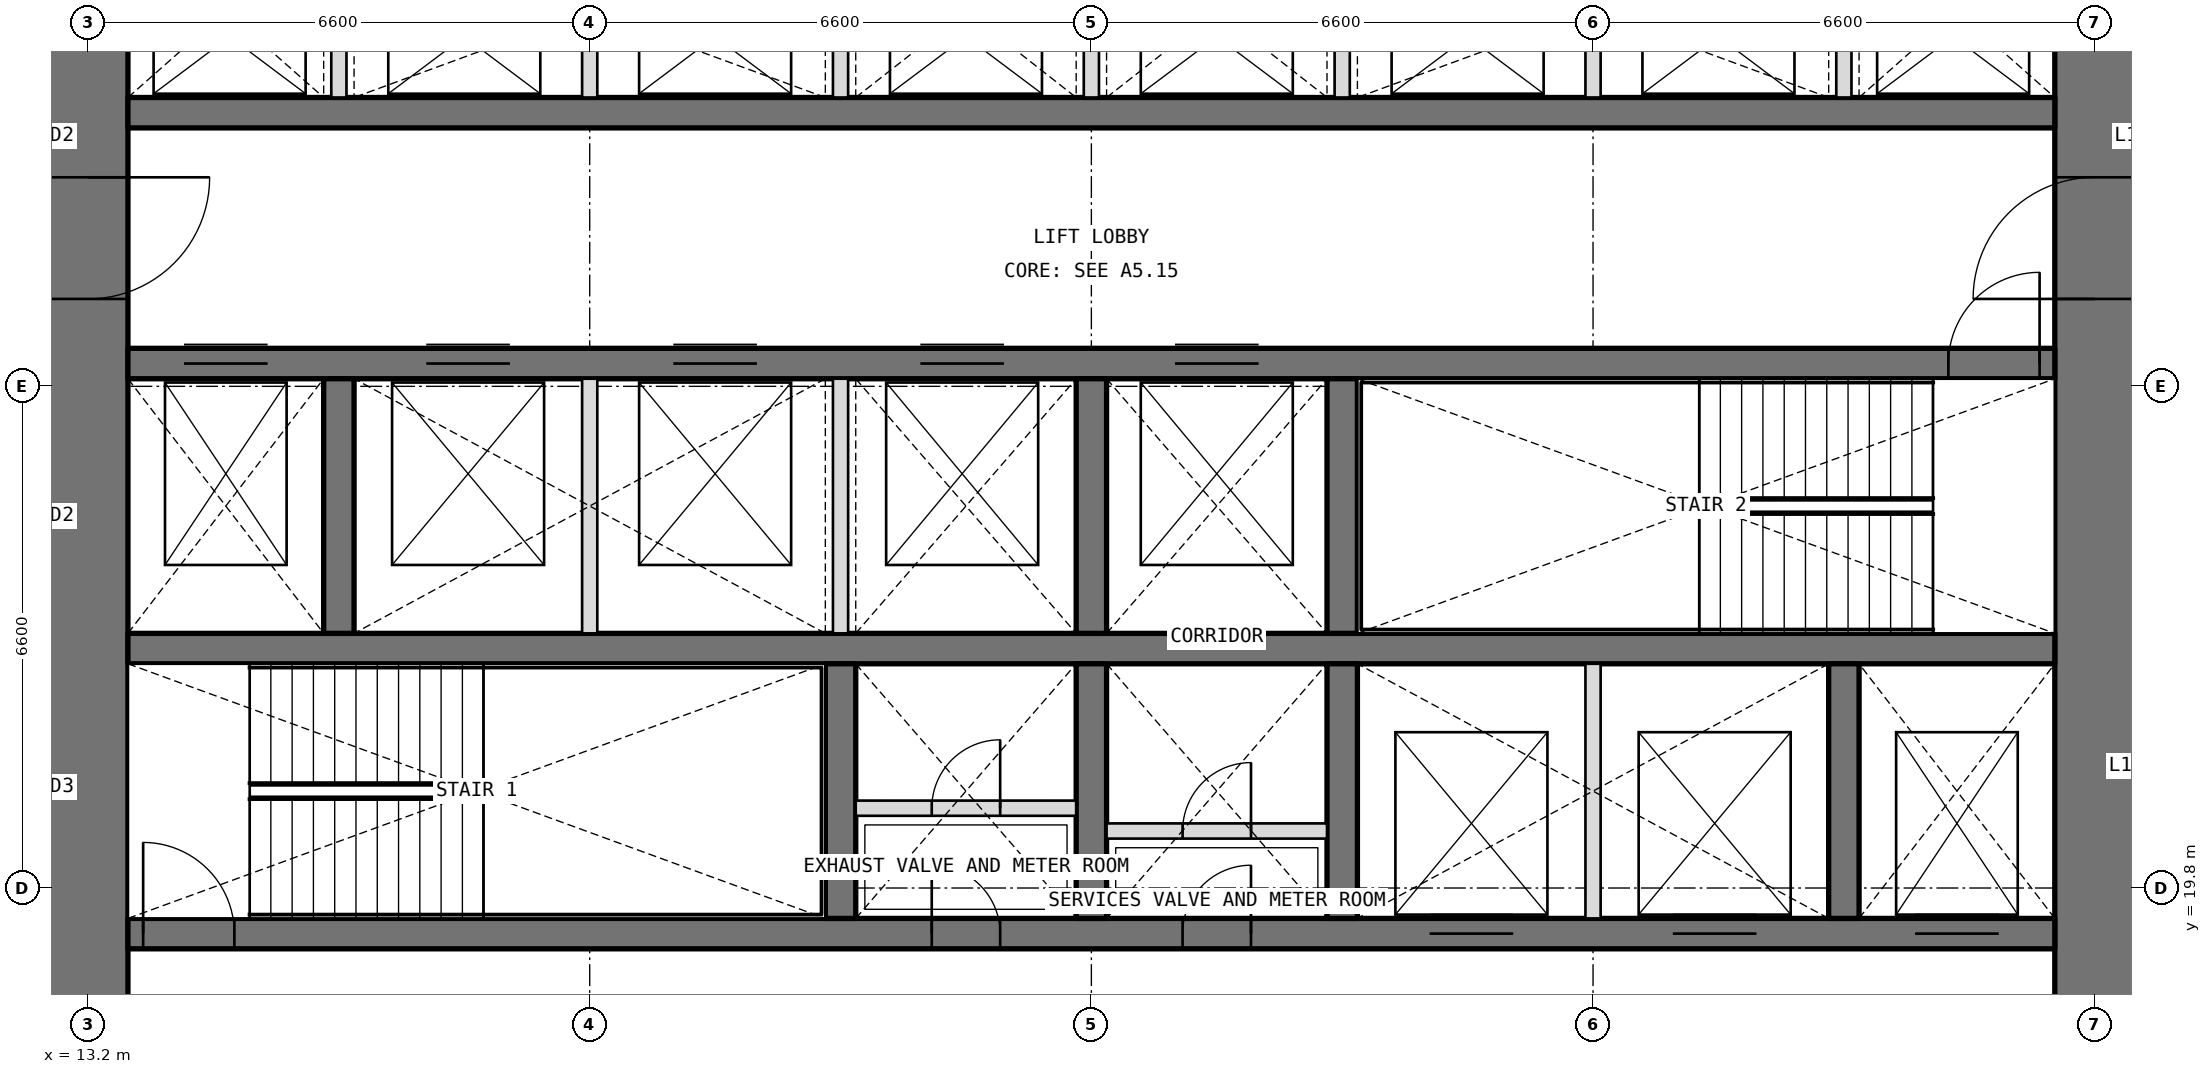
"""IFC4 building model, lengths in metres.
Left out: names, types, materials, properties, quantities, classifications, styles, units other than length and angle.
Written with IfcOpenShell. Run it as: python <this file> out.ifc"""

import sys

from ifc_helpers import new_model, si_unit, direction, frame, frame_2d, origin, place, context, subcontext, project, spatial, rectangle, extrude, element, fill, save


model = new_model("IFC4")
c1 = context("Model", 3, precision=1e-05, world=origin(), true_north=direction((0.0, 1.0)))
c2 = subcontext(c1, "Body", "Model", "MODEL_VIEW")
j1 = project(units=[si_unit("LENGTHUNIT", "METRE"), si_unit("PLANEANGLEUNIT", "RADIAN")], contexts=[c1])
p1 = place(None, origin())
s1 = spatial("IfcSite", under=j1, at=p1, CompositionType="ELEMENT")
p2 = place(p1, origin())
s2 = spatial("IfcBuilding", under=s1, at=p2, CompositionType="ELEMENT")
p3 = place(p2, frame((0.0, 0.0, 59.1)))
s3 = spatial("IfcBuildingStorey", under=s2, at=p3, CompositionType="ELEMENT", Elevation=59.1)
p4 = place(p3, frame((39.6, 13.725, 0.0), z_axis=(0.0, 0.0, 1.0), x_axis=(0.0, 1.0, 0.0)))
e1 = element("IfcWall", 1, at=p4, inside=s3, PredefinedType="SHEAR", context=c2, shape_type="SweptSolid", body=[
    extrude(rectangle(XDim=18.75, YDim=1.05, at=frame_2d((9.375, 0.0))), origin(), (0.0, 0.0, 1.0), 4.2),
])
p5 = place(p4, frame((3.025, 0.0, 0.0)))
e2 = element("IfcOpeningElement", 2, at=p5, cuts=e1, PredefinedType="OPENING", context=c2, shape_type="SweptSolid", body=[
    extrude(rectangle(XDim=1.6, YDim=2.1, at=frame_2d((0.8, 1.05))), frame((0.0, 0.535, 0.0), z_axis=(0.0, -1.0, 0.0), x_axis=(1.0, 0.0, 0.0)), (0.0, 0.0, 1.0), 1.07),
])
p6 = place(p4, frame((13.825, 0.0, 0.0)))
e3 = element("IfcOpeningElement", 3, at=p6, cuts=e1, PredefinedType="OPENING", context=c2, shape_type="SweptSolid", body=[
    extrude(rectangle(XDim=1.6, YDim=2.1, at=frame_2d((0.8, 1.05))), frame((0.0, 0.535, 0.0), z_axis=(0.0, -1.0, 0.0), x_axis=(1.0, 0.0, 0.0)), (0.0, 0.0, 1.0), 1.07),
])
p7 = place(p3, frame((13.2, 32.475, 0.0), z_axis=(0.0, 0.0, 1.0), x_axis=(0.0, -1.0, 0.0)))
e4 = element("IfcWall", 4, at=p7, inside=s3, PredefinedType="SHEAR", context=c2, shape_type="SweptSolid", body=[
    extrude(rectangle(XDim=18.75, YDim=1.05, at=frame_2d((9.375, 0.0))), origin(), (0.0, 0.0, 1.0), 4.2),
])
p8 = place(p7, frame((14.125, 0.0, 0.0)))
e5 = element("IfcOpeningElement", 5, at=p8, cuts=e4, PredefinedType="OPENING", context=c2, shape_type="SweptSolid", body=[
    extrude(rectangle(XDim=1.6, YDim=2.1, at=frame_2d((0.8, 1.05))), frame((0.0, 0.535, 0.0), z_axis=(0.0, -1.0, 0.0), x_axis=(1.0, 0.0, 0.0)), (0.0, 0.0, 1.0), 1.07),
])
p9 = place(p7, frame((3.325, 0.0, 0.0)))
e6 = element("IfcOpeningElement", 6, at=p9, cuts=e4, PredefinedType="OPENING", context=c2, shape_type="SweptSolid", body=[
    extrude(rectangle(XDim=1.6, YDim=2.1, at=frame_2d((0.8, 1.05))), frame((0.0, 0.535, 0.0), z_axis=(0.0, -1.0, 0.0), x_axis=(1.0, 0.0, 0.0)), (0.0, 0.0, 1.0), 1.07),
])
p10 = place(p3, frame((13.725, 19.2, 0.0), z_axis=(0.0, 0.0, 1.0), x_axis=(1.0, 0.0, 0.0)))
e7 = element("IfcWall", 7, at=p10, inside=s3, PredefinedType="SHEAR", context=c2, shape_type="SweptSolid", body=[
    extrude(rectangle(XDim=25.35, YDim=0.4, at=frame_2d((12.675, 0.0))), origin(), (0.0, 0.0, 1.0), 4.2),
])
p11 = place(p10, frame((10.575, 0.0, 0.0)))
e8 = element("IfcOpeningElement", 8, at=p11, cuts=e7, PredefinedType="OPENING", context=c2, shape_type="SweptSolid", body=[
    extrude(rectangle(XDim=0.9, YDim=2.1, at=frame_2d((0.45, 1.05))), frame((0.0, 0.21, 0.0), z_axis=(0.0, -1.0, 0.0), x_axis=(1.0, 0.0, 0.0)), (0.0, 0.0, 1.0), 0.42),
])
p12 = place(p10, frame((13.875, 0.0, 0.0)))
e9 = element("IfcOpeningElement", 9, at=p12, cuts=e7, PredefinedType="OPENING", context=c2, shape_type="SweptSolid", body=[
    extrude(rectangle(XDim=0.9, YDim=2.1, at=frame_2d((0.45, 1.05))), frame((0.0, 0.21, 0.0), z_axis=(0.0, -1.0, 0.0), x_axis=(1.0, 0.0, 0.0)), (0.0, 0.0, 1.0), 0.42),
])
p13 = place(p10, frame((0.2, 0.0, 0.0)))
e10 = element("IfcOpeningElement", 10, at=p13, cuts=e7, PredefinedType="OPENING", context=c2, shape_type="SweptSolid", body=[
    extrude(rectangle(XDim=1.2, YDim=2.1, at=frame_2d((0.6, 1.05))), frame((0.0, 0.21, 0.0), z_axis=(0.0, -1.0, 0.0), x_axis=(1.0, 0.0, 0.0)), (0.0, 0.0, 1.0), 0.42),
])
p14 = place(p10, frame((23.512, 0.0, 0.0)))
e11 = element("IfcOpeningElement", 11, at=p14, cuts=e7, PredefinedType="OPENING", context=c2, shape_type="SweptSolid", body=[
    extrude(rectangle(XDim=1.1, YDim=2.1, at=frame_2d((0.55, 1.05))), frame((0.0, 0.21, 0.0), z_axis=(0.0, -1.0, 0.0), x_axis=(1.0, 0.0, 0.0)), (0.0, 0.0, 1.0), 0.42),
])
p15 = place(p10, frame((17.125, 0.0, 0.0)))
e12 = element("IfcOpeningElement", 12, at=p15, cuts=e7, PredefinedType="OPENING", context=c2, shape_type="SweptSolid", body=[
    extrude(rectangle(XDim=1.1, YDim=2.1, at=frame_2d((0.55, 1.05))), frame((0.0, 0.21, 0.0), z_axis=(0.0, -1.0, 0.0), x_axis=(1.0, 0.0, 0.0)), (0.0, 0.0, 1.0), 0.42),
])
p16 = place(p10, frame((20.325, 0.0, 0.0)))
e13 = element("IfcOpeningElement", 13, at=p16, cuts=e7, PredefinedType="OPENING", context=c2, shape_type="SweptSolid", body=[
    extrude(rectangle(XDim=1.1, YDim=2.1, at=frame_2d((0.55, 1.05))), frame((0.0, 0.21, 0.0), z_axis=(0.0, -1.0, 0.0), x_axis=(1.0, 0.0, 0.0)), (0.0, 0.0, 1.0), 0.42),
])
p17 = place(p3, frame((13.725, 22.95, 0.0), z_axis=(0.0, 0.0, 1.0), x_axis=(1.0, 0.0, 0.0)))
e14 = element("IfcWall", 14, at=p17, inside=s3, PredefinedType="SHEAR", context=c2, shape_type="SweptSolid", body=[
    extrude(rectangle(XDim=25.35, YDim=0.4, at=frame_2d((12.675, 0.0))), origin(), (0.0, 0.0, 1.0), 4.2),
])
p18 = place(p3, frame((13.725, 26.7, 0.0), z_axis=(0.0, 0.0, 1.0), x_axis=(1.0, 0.0, 0.0)))
e15 = element("IfcWall", 15, at=p18, inside=s3, PredefinedType="SHEAR", context=c2, shape_type="SweptSolid", body=[
    extrude(rectangle(XDim=25.35, YDim=0.4, at=frame_2d((12.675, 0.0))), origin(), (0.0, 0.0, 1.0), 4.2),
])
p19 = place(p18, frame((23.95, 0.0, 0.0)))
e16 = element("IfcOpeningElement", 16, at=p19, cuts=e15, PredefinedType="OPENING", context=c2, shape_type="SweptSolid", body=[
    extrude(rectangle(XDim=1.2, YDim=2.1, at=frame_2d((0.6, 1.05))), frame((0.0, 0.21, 0.0), z_axis=(0.0, -1.0, 0.0), x_axis=(1.0, 0.0, 0.0)), (0.0, 0.0, 1.0), 0.42),
])
p20 = place(p18, frame((0.738, 0.0, 0.0)))
e17 = element("IfcOpeningElement", 17, at=p20, cuts=e15, PredefinedType="OPENING", context=c2, shape_type="SweptSolid", body=[
    extrude(rectangle(XDim=1.1, YDim=2.1, at=frame_2d((0.55, 1.05))), frame((0.0, 0.21, 0.0), z_axis=(0.0, -1.0, 0.0), x_axis=(1.0, 0.0, 0.0)), (0.0, 0.0, 1.0), 0.42),
])
p21 = place(p18, frame((3.925, 0.0, 0.0)))
e18 = element("IfcOpeningElement", 18, at=p21, cuts=e15, PredefinedType="OPENING", context=c2, shape_type="SweptSolid", body=[
    extrude(rectangle(XDim=1.1, YDim=2.1, at=frame_2d((0.55, 1.05))), frame((0.0, 0.21, 0.0), z_axis=(0.0, -1.0, 0.0), x_axis=(1.0, 0.0, 0.0)), (0.0, 0.0, 1.0), 0.42),
])
p22 = place(p18, frame((7.175, 0.0, 0.0)))
e19 = element("IfcOpeningElement", 19, at=p22, cuts=e15, PredefinedType="OPENING", context=c2, shape_type="SweptSolid", body=[
    extrude(rectangle(XDim=1.1, YDim=2.1, at=frame_2d((0.55, 1.05))), frame((0.0, 0.21, 0.0), z_axis=(0.0, -1.0, 0.0), x_axis=(1.0, 0.0, 0.0)), (0.0, 0.0, 1.0), 0.42),
])
p23 = place(p18, frame((10.425, 0.0, 0.0)))
e20 = element("IfcOpeningElement", 20, at=p23, cuts=e15, PredefinedType="OPENING", context=c2, shape_type="SweptSolid", body=[
    extrude(rectangle(XDim=1.1, YDim=2.1, at=frame_2d((0.55, 1.05))), frame((0.0, 0.21, 0.0), z_axis=(0.0, -1.0, 0.0), x_axis=(1.0, 0.0, 0.0)), (0.0, 0.0, 1.0), 0.42),
])
p24 = place(p18, frame((13.775, 0.0, 0.0)))
e21 = element("IfcOpeningElement", 21, at=p24, cuts=e15, PredefinedType="OPENING", context=c2, shape_type="SweptSolid", body=[
    extrude(rectangle(XDim=1.1, YDim=2.1, at=frame_2d((0.55, 1.05))), frame((0.0, 0.21, 0.0), z_axis=(0.0, -1.0, 0.0), x_axis=(1.0, 0.0, 0.0)), (0.0, 0.0, 1.0), 0.42),
])
p25 = place(p3, frame((13.725, 30.0, 0.0), z_axis=(0.0, 0.0, 1.0), x_axis=(1.0, 0.0, 0.0)))
e22 = element("IfcWall", 22, at=p25, inside=s3, PredefinedType="SHEAR", context=c2, shape_type="SweptSolid", body=[
    extrude(rectangle(XDim=25.35, YDim=0.4, at=frame_2d((12.675, 0.0))), origin(), (0.0, 0.0, 1.0), 4.2),
])
for number, where, z_axis, x_axis in (
    (23, (23.1, 19.4, 0.0), (0.0, 0.0, 1.0), (0.0, 1.0, 0.0)),
    (24, (26.4, 19.4, 0.0), (0.0, 0.0, 1.0), (0.0, 1.0, 0.0)),
    (25, (29.7, 19.4, 0.0), (0.0, 0.0, 1.0), (0.0, 1.0, 0.0)),
    (26, (36.3, 19.4, 0.0), (0.0, 0.0, 1.0), (0.0, 1.0, 0.0)),
    (27, (16.5, 23.15, 0.0), (0.0, 0.0, 1.0), (0.0, 1.0, 0.0)),
    (28, (26.4, 23.15, 0.0), (0.0, 0.0, 1.0), (0.0, 1.0, 0.0)),
    (29, (29.7, 23.15, 0.0), (0.0, 0.0, 1.0), (0.0, 1.0, 0.0)),
):
    element("IfcWall", number, at=place(p3, frame(where, z_axis=z_axis, x_axis=x_axis)), inside=s3, PredefinedType="SHEAR", context=c2, shape_type="SweptSolid", body=[
        extrude(rectangle(XDim=3.35, YDim=0.4, at=frame_2d((1.675, 0.0))), origin(), (0.0, 0.0, 1.0), 4.2),
    ])
for number, where, z_axis, x_axis in (
    (30, (16.5, 30.2, 0.0), (0.0, 0.0, 1.0), (0.0, 1.0, 0.0)),
    (31, (19.8, 30.2, 0.0), (0.0, 0.0, 1.0), (0.0, 1.0, 0.0)),
    (32, (23.1, 30.2, 0.0), (0.0, 0.0, 1.0), (0.0, 1.0, 0.0)),
    (33, (26.4, 30.2, 0.0), (0.0, 0.0, 1.0), (0.0, 1.0, 0.0)),
    (34, (29.7, 30.2, 0.0), (0.0, 0.0, 1.0), (0.0, 1.0, 0.0)),
    (35, (33.0, 30.2, 0.0), (0.0, 0.0, 1.0), (0.0, 1.0, 0.0)),
    (36, (36.3, 30.2, 0.0), (0.0, 0.0, 1.0), (0.0, 1.0, 0.0)),
):
    element("IfcWall", number, at=place(p3, frame(where, z_axis=z_axis, x_axis=x_axis)), inside=s3, PredefinedType="PARTITIONING", context=c2, shape_type="SweptSolid", body=[
        extrude(rectangle(XDim=2.275, YDim=0.2, at=frame_2d((1.138, 0.0))), origin(), (0.0, 0.0, 1.0), 4.2),
    ])
for number, where, z_axis, x_axis in (
    (37, (33.0, 19.4, 0.0), (0.0, 0.0, 1.0), (0.0, 1.0, 0.0)),
    (38, (19.8, 23.15, 0.0), (0.0, 0.0, 1.0), (0.0, 1.0, 0.0)),
    (39, (23.1, 23.15, 0.0), (0.0, 0.0, 1.0), (0.0, 1.0, 0.0)),
):
    element("IfcWall", number, at=place(p3, frame(where, z_axis=z_axis, x_axis=x_axis)), inside=s3, PredefinedType="PARTITIONING", context=c2, shape_type="SweptSolid", body=[
        extrude(rectangle(XDim=3.35, YDim=0.2, at=frame_2d((1.675, 0.0))), origin(), (0.0, 0.0, 1.0), 4.2),
    ])
p26 = place(p3, frame((23.3, 20.85, 0.0), z_axis=(0.0, 0.0, 1.0), x_axis=(1.0, 0.0, 0.0)))
e40 = element("IfcWall", 40, at=p26, inside=s3, PredefinedType="PARTITIONING", context=c2, shape_type="SweptSolid", body=[
    extrude(rectangle(XDim=2.9, YDim=0.2, at=frame_2d((1.45, 0.0))), origin(), (0.0, 0.0, 1.0), 3.9),
])
p27 = place(p26, frame((1.0, 0.0, 0.0)))
e41 = element("IfcOpeningElement", 41, at=p27, cuts=e40, PredefinedType="OPENING", context=c2, shape_type="SweptSolid", body=[
    extrude(rectangle(XDim=0.9, YDim=2.1, at=frame_2d((0.45, 1.05))), frame((0.0, 0.11, 0.0), z_axis=(0.0, -1.0, 0.0), x_axis=(1.0, 0.0, 0.0)), (0.0, 0.0, 1.0), 0.22),
])
p28 = place(p3, frame((26.6, 20.55, 0.0), z_axis=(0.0, 0.0, 1.0), x_axis=(1.0, 0.0, 0.0)))
e42 = element("IfcWall", 42, at=p28, inside=s3, PredefinedType="PARTITIONING", context=c2, shape_type="SweptSolid", body=[
    extrude(rectangle(XDim=2.9, YDim=0.2, at=frame_2d((1.45, 0.0))), origin(), (0.0, 0.0, 1.0), 3.9),
])
p29 = place(p28, frame((1.0, 0.0, 0.0)))
e43 = element("IfcOpeningElement", 43, at=p29, cuts=e42, PredefinedType="OPENING", context=c2, shape_type="SweptSolid", body=[
    extrude(rectangle(XDim=0.9, YDim=2.1, at=frame_2d((0.45, 1.05))), frame((0.0, 0.11, 0.0), z_axis=(0.0, -1.0, 0.0), x_axis=(1.0, 0.0, 0.0)), (0.0, 0.0, 1.0), 0.22),
])
p30 = place(p11, origin())
e44 = element("IfcDoor", 44, at=p30, inside=s3, OperationType="SINGLE_SWING_LEFT", PredefinedType="DOOR", context=c2, shape_type="SweptSolid", body=[
    extrude(rectangle(XDim=0.9, YDim=2.1, at=frame_2d((0.45, 1.05))), frame((0.0, 0.025, 0.0), z_axis=(0.0, -1.0, 0.0), x_axis=(1.0, 0.0, 0.0)), (0.0, 0.0, 1.0), 0.05),
])
fill(e8, e44)
p31 = place(p27, origin())
e45 = element("IfcDoor", 45, at=p31, inside=s3, OperationType="SINGLE_SWING_RIGHT", PredefinedType="DOOR", context=c2, shape_type="SweptSolid", body=[
    extrude(rectangle(XDim=0.9, YDim=2.1, at=frame_2d((0.45, 1.05))), frame((0.0, 0.025, 0.0), z_axis=(0.0, -1.0, 0.0), x_axis=(1.0, 0.0, 0.0)), (0.0, 0.0, 1.0), 0.05),
])
fill(e41, e45)
p32 = place(p12, origin())
e46 = element("IfcDoor", 46, at=p32, inside=s3, OperationType="SINGLE_SWING_RIGHT", PredefinedType="DOOR", context=c2, shape_type="SweptSolid", body=[
    extrude(rectangle(XDim=0.9, YDim=2.1, at=frame_2d((0.45, 1.05))), frame((0.0, 0.025, 0.0), z_axis=(0.0, -1.0, 0.0), x_axis=(1.0, 0.0, 0.0)), (0.0, 0.0, 1.0), 0.05),
])
fill(e9, e46)
p33 = place(p29, origin())
e47 = element("IfcDoor", 47, at=p33, inside=s3, OperationType="SINGLE_SWING_RIGHT", PredefinedType="DOOR", context=c2, shape_type="SweptSolid", body=[
    extrude(rectangle(XDim=0.9, YDim=2.1, at=frame_2d((0.45, 1.05))), frame((0.0, 0.025, 0.0), z_axis=(0.0, -1.0, 0.0), x_axis=(1.0, 0.0, 0.0)), (0.0, 0.0, 1.0), 0.05),
])
fill(e43, e47)
p34 = place(p13, origin())
e48 = element("IfcDoor", 48, at=p34, inside=s3, OperationType="SINGLE_SWING_LEFT", PredefinedType="DOOR", context=c2, shape_type="SweptSolid", body=[
    extrude(rectangle(XDim=1.2, YDim=2.1, at=frame_2d((0.6, 1.05))), frame((0.0, 0.025, 0.0), z_axis=(0.0, -1.0, 0.0), x_axis=(1.0, 0.0, 0.0)), (0.0, 0.0, 1.0), 0.05),
])
fill(e10, e48)
p35 = place(p19, origin())
e49 = element("IfcDoor", 49, at=p35, inside=s3, OperationType="SINGLE_SWING_RIGHT", PredefinedType="DOOR", context=c2, shape_type="SweptSolid", body=[
    extrude(rectangle(XDim=1.2, YDim=2.1, at=frame_2d((0.6, 1.05))), frame((0.0, 0.025, 0.0), z_axis=(0.0, -1.0, 0.0), x_axis=(1.0, 0.0, 0.0)), (0.0, 0.0, 1.0), 0.05),
])
fill(e16, e49)
p36 = place(p9, origin())
e50 = element("IfcDoor", 50, at=p36, inside=s3, OperationType="DOUBLE_DOOR_DOUBLE_SWING", PredefinedType="DOOR", context=c2, shape_type="SweptSolid", body=[
    extrude(rectangle(XDim=1.6, YDim=2.1, at=frame_2d((0.8, 1.05))), frame((0.0, 0.025, 0.0), z_axis=(0.0, -1.0, 0.0), x_axis=(1.0, 0.0, 0.0)), (0.0, 0.0, 1.0), 0.05),
])
fill(e6, e50)
p37 = place(p6, origin())
e51 = element("IfcDoor", 51, at=p37, inside=s3, OperationType="DOUBLE_DOOR_DOUBLE_SWING", PredefinedType="DOOR", context=c2, shape_type="SweptSolid", body=[
    extrude(rectangle(XDim=1.6, YDim=2.1, at=frame_2d((0.8, 1.05))), frame((0.0, 0.025, 0.0), z_axis=(0.0, -1.0, 0.0), x_axis=(1.0, 0.0, 0.0)), (0.0, 0.0, 1.0), 0.05),
])
fill(e3, e51)
p38 = place(p20, origin())
e52 = element("IfcDoor", 52, at=p38, inside=s3, OperationType="DOUBLE_DOOR_SLIDING", PredefinedType="DOOR", context=c2, shape_type="SweptSolid", body=[
    extrude(rectangle(XDim=1.1, YDim=2.1, at=frame_2d((0.55, 1.05))), frame((0.0, 0.025, 0.0), z_axis=(0.0, -1.0, 0.0), x_axis=(1.0, 0.0, 0.0)), (0.0, 0.0, 1.0), 0.05),
])
fill(e17, e52)
p39 = place(p14, origin())
e53 = element("IfcDoor", 53, at=p39, inside=s3, OperationType="DOUBLE_DOOR_SLIDING", PredefinedType="DOOR", context=c2, shape_type="SweptSolid", body=[
    extrude(rectangle(XDim=1.1, YDim=2.1, at=frame_2d((0.55, 1.05))), frame((0.0, 0.025, 0.0), z_axis=(0.0, -1.0, 0.0), x_axis=(1.0, 0.0, 0.0)), (0.0, 0.0, 1.0), 0.05),
])
fill(e11, e53)
p40 = place(p15, origin())
e54 = element("IfcDoor", 54, at=p40, inside=s3, OperationType="DOUBLE_DOOR_SLIDING", PredefinedType="DOOR", context=c2, shape_type="SweptSolid", body=[
    extrude(rectangle(XDim=1.1, YDim=2.1, at=frame_2d((0.55, 1.05))), frame((0.0, 0.025, 0.0), z_axis=(0.0, -1.0, 0.0), x_axis=(1.0, 0.0, 0.0)), (0.0, 0.0, 1.0), 0.05),
])
fill(e12, e54)
p41 = place(p16, origin())
e55 = element("IfcDoor", 55, at=p41, inside=s3, OperationType="DOUBLE_DOOR_SLIDING", PredefinedType="DOOR", context=c2, shape_type="SweptSolid", body=[
    extrude(rectangle(XDim=1.1, YDim=2.1, at=frame_2d((0.55, 1.05))), frame((0.0, 0.025, 0.0), z_axis=(0.0, -1.0, 0.0), x_axis=(1.0, 0.0, 0.0)), (0.0, 0.0, 1.0), 0.05),
])
fill(e13, e55)
p42 = place(p21, origin())
e56 = element("IfcDoor", 56, at=p42, inside=s3, OperationType="DOUBLE_DOOR_SLIDING", PredefinedType="DOOR", context=c2, shape_type="SweptSolid", body=[
    extrude(rectangle(XDim=1.1, YDim=2.1, at=frame_2d((0.55, 1.05))), frame((0.0, 0.025, 0.0), z_axis=(0.0, -1.0, 0.0), x_axis=(1.0, 0.0, 0.0)), (0.0, 0.0, 1.0), 0.05),
])
fill(e18, e56)
p43 = place(p22, origin())
e57 = element("IfcDoor", 57, at=p43, inside=s3, OperationType="DOUBLE_DOOR_SLIDING", PredefinedType="DOOR", context=c2, shape_type="SweptSolid", body=[
    extrude(rectangle(XDim=1.1, YDim=2.1, at=frame_2d((0.55, 1.05))), frame((0.0, 0.025, 0.0), z_axis=(0.0, -1.0, 0.0), x_axis=(1.0, 0.0, 0.0)), (0.0, 0.0, 1.0), 0.05),
])
fill(e19, e57)
p44 = place(p23, origin())
e58 = element("IfcDoor", 58, at=p44, inside=s3, OperationType="DOUBLE_DOOR_SLIDING", PredefinedType="DOOR", context=c2, shape_type="SweptSolid", body=[
    extrude(rectangle(XDim=1.1, YDim=2.1, at=frame_2d((0.55, 1.05))), frame((0.0, 0.025, 0.0), z_axis=(0.0, -1.0, 0.0), x_axis=(1.0, 0.0, 0.0)), (0.0, 0.0, 1.0), 0.05),
])
fill(e20, e58)
p45 = place(p24, origin())
e59 = element("IfcDoor", 59, at=p45, inside=s3, OperationType="DOUBLE_DOOR_SLIDING", PredefinedType="DOOR", context=c2, shape_type="SweptSolid", body=[
    extrude(rectangle(XDim=1.1, YDim=2.1, at=frame_2d((0.55, 1.05))), frame((0.0, 0.025, 0.0), z_axis=(0.0, -1.0, 0.0), x_axis=(1.0, 0.0, 0.0)), (0.0, 0.0, 1.0), 0.05),
])
fill(e21, e59)
save(model, sys.argv[1])
